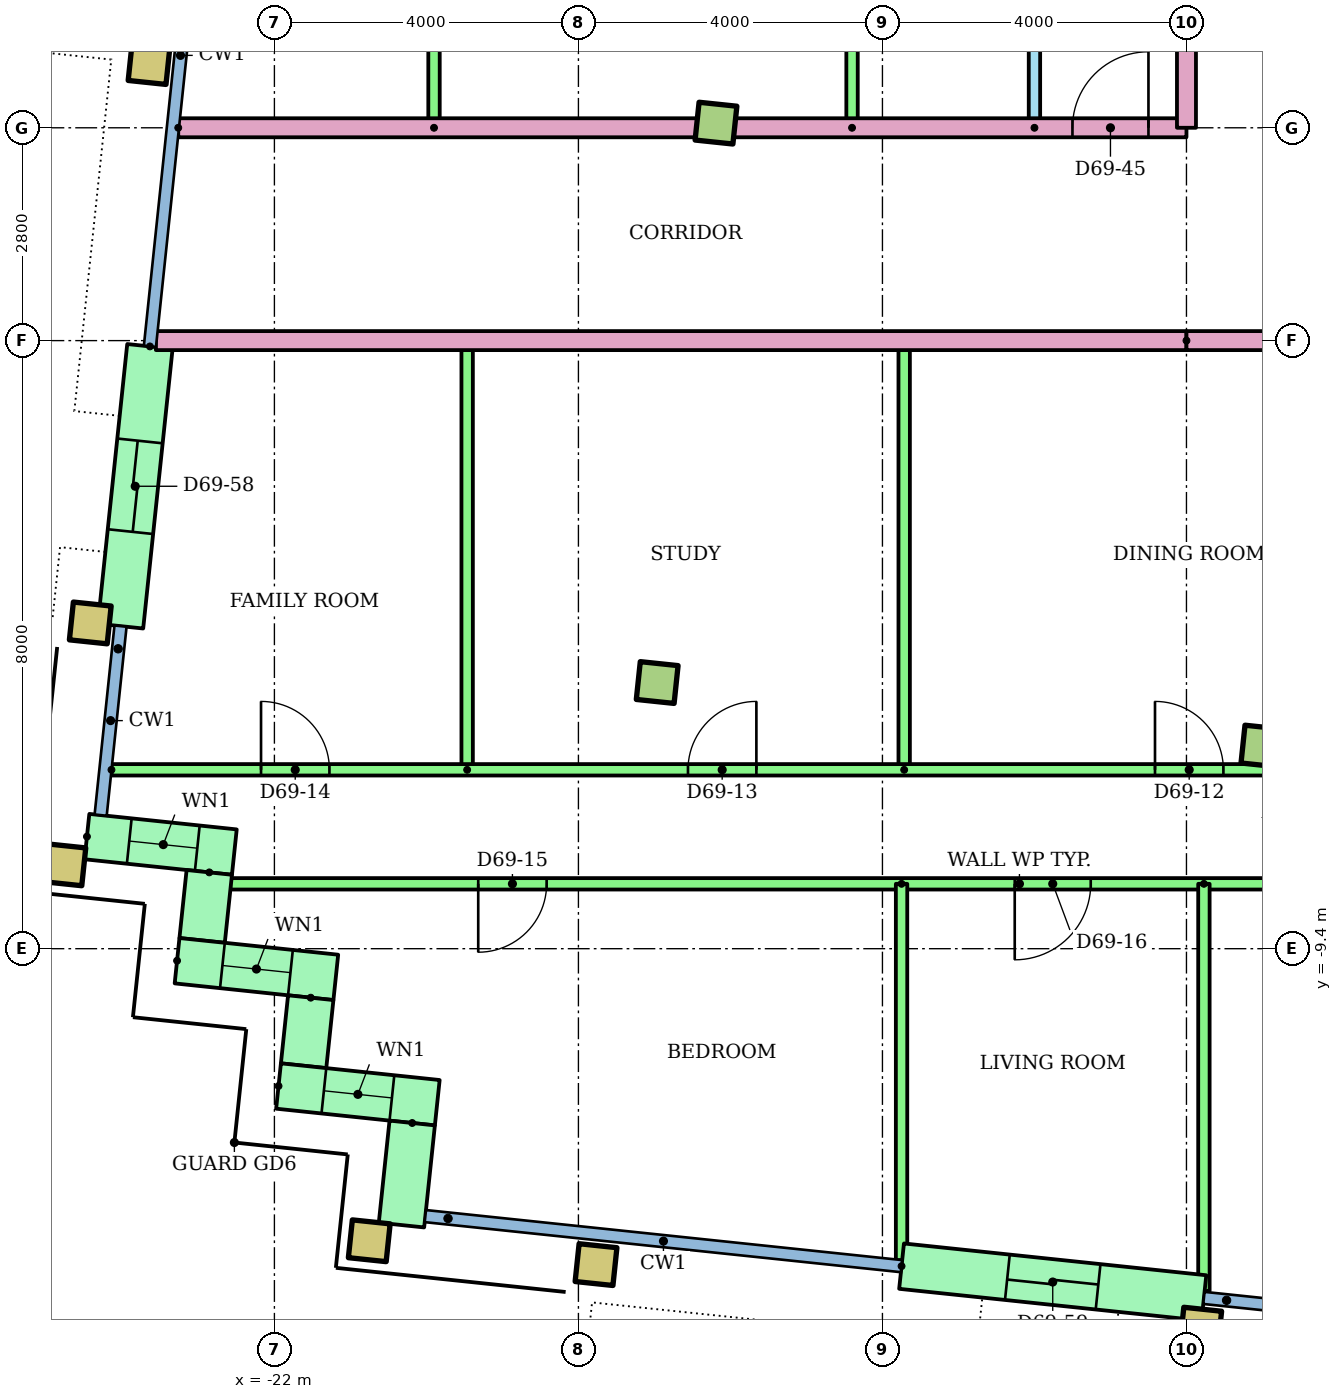
"""IFC4 building model, lengths in metres.
Left out: names, types, materials, properties, quantities, classifications, styles, units other than length and angle.
Written with IfcOpenShell. Run it as: python <this file> out.ifc"""

import sys

from ifc_helpers import new_model, si_unit, direction, frame, frame_2d, origin, origin_2d, place, context, subcontext, project, spatial, rectangle, hollow_rectangle, extrude, element, fill, save


model = new_model("IFC4")
c1 = context("Model", 3, precision=1e-05, world=origin(), true_north=direction((0.0, 1.0)))
c2 = subcontext(c1, "Body", "Model", "MODEL_VIEW")
j1 = project(units=[si_unit("LENGTHUNIT", "METRE"), si_unit("PLANEANGLEUNIT", "RADIAN")], contexts=[c1])
p1 = place(None, origin())
s1 = spatial("IfcSite", under=j1, at=p1, CompositionType="ELEMENT")
p2 = place(p1, origin())
s2 = spatial("IfcBuilding", under=s1, at=p2, CompositionType="ELEMENT")
p3 = place(p2, frame((0.0, 0.0, 265.9)))
s3 = spatial("IfcBuildingStorey", under=s2, at=p3, CompositionType="ELEMENT", Elevation=265.9)
for number, where, z_axis, x_axis in (
    (1, (-20.752, -13.243, 0.0), (0.0, 0.0, 1.0), (0.995, -0.105, 0.0)),
    (2, (-17.768, -13.556, 0.0), (0.0, 0.0, 1.0), (0.995, -0.105, 0.0)),
    (3, (-9.812, -14.392, 0.0), (0.0, 0.0, 1.0), (0.995, -0.105, 0.0)),
    (4, (-24.757, -8.297, 0.0), (0.0, 0.0, 1.0), (0.995, -0.105, 0.0)),
    (5, (-24.423, -5.115, 0.0), (0.0, 0.0, 1.0), (0.995, -0.105, 0.0)),
):
    element("IfcColumn", number, at=place(p3, frame(where, z_axis=z_axis, x_axis=x_axis)), inside=s3, PredefinedType="COLUMN", context=c2, shape_type="SweptSolid", body=[
        extrude(hollow_rectangle(XDim=0.5, YDim=0.5, WallThickness=0.025, at=origin_2d()), origin(), (0.0, 0.0, 1.0), 3.2),
    ])
for number, where, z_axis, x_axis in (
    (6, (-16.964, -5.898, 0.0), (0.0, 0.0, 1.0), (0.995, -0.105, 0.0)),
    (7, (-9.007, -6.735, 0.0), (0.0, 0.0, 1.0), (0.995, -0.105, 0.0)),
):
    element("IfcColumn", number, at=place(p3, frame(where, z_axis=z_axis, x_axis=x_axis)), inside=s3, PredefinedType="COLUMN", context=c2, shape_type="SweptSolid", body=[
        extrude(rectangle(XDim=0.5, YDim=0.5, at=origin_2d()), origin(), (0.0, 0.0, 1.0), 3.2),
    ])
p4 = place(p3, frame((-23.649, 2.245, 0.0), z_axis=(0.0, 0.0, 1.0), x_axis=(0.994521895368, -0.104528463268, 0.0)))
e8 = element("IfcColumn", 8, at=p4, inside=s3, PredefinedType="COLUMN", context=c2, shape_type="SweptSolid", body=[
    extrude(hollow_rectangle(XDim=0.5, YDim=0.5, WallThickness=0.025, at=origin_2d()), origin(), (0.0, 0.0, 1.0), 3.2),
])
p5 = place(p3, frame((-16.19, 1.461, 0.0), z_axis=(0.0, 0.0, 1.0), x_axis=(0.994521895368, -0.104528463268, 0.0)))
e9 = element("IfcColumn", 9, at=p5, inside=s3, PredefinedType="COLUMN", context=c2, shape_type="SweptSolid", body=[
    extrude(rectangle(XDim=0.5, YDim=0.5, at=origin_2d()), origin(), (0.0, 0.0, 1.0), 3.2),
])
p6 = place(p3, frame((-23.638, -1.476, 0.0), z_axis=(0.0, 0.0, 1.0), x_axis=(-0.104513052986, -0.994523514933, 0.0)))
e10 = element("IfcWall", 10, at=p6, inside=s3, PredefinedType="STANDARD", context=c2, shape_type="SweptSolid", body=[
    extrude(rectangle(XDim=3.7, YDim=0.6, at=frame_2d((1.85, 0.0))), origin(), (0.0, 0.0, 1.0), 2.92),
])
p7 = place(p6, frame((1.25, 0.0, 0.0)))
e11 = element("IfcOpeningElement", 11, at=p7, cuts=e10, PredefinedType="OPENING", context=c2, shape_type="SweptSolid", body=[
    extrude(rectangle(XDim=1.2, YDim=2.1, at=frame_2d((0.6, 1.05))), frame((0.0, 0.31, 0.0), z_axis=(0.0, -1.0, 0.0), x_axis=(1.0, 0.0, 0.0)), (0.0, 0.0, 1.0), 0.62),
])
p8 = place(p3, frame((-24.467, -7.925, 0.0), z_axis=(0.0, 0.0, 1.0), x_axis=(0.994521219184, -0.104534896528, 0.0)))
e12 = element("IfcWall", 12, at=p8, inside=s3, PredefinedType="STANDARD", context=c2, shape_type="SweptSolid", body=[
    extrude(rectangle(XDim=1.95, YDim=0.6, at=frame_2d((0.975, 0.0))), origin(), (0.0, 0.0, 1.0), 2.92),
])
p9 = place(p8, frame((0.56, 0.0, 0.9)))
e13 = element("IfcOpeningElement", 13, at=p9, cuts=e12, PredefinedType="OPENING", context=c2, shape_type="SweptSolid", body=[
    extrude(rectangle(XDim=0.9, YDim=1.5, at=frame_2d((0.45, 0.75))), frame((0.0, 0.31, 0.0), z_axis=(0.0, -1.0, 0.0), x_axis=(1.0, 0.0, 0.0)), (0.0, 0.0, 1.0), 0.62),
])
p10 = place(p3, frame((-22.857, -8.396, 0.0), z_axis=(0.0, 0.0, 1.0), x_axis=(-0.104444712852, -0.994530694326, 0.0)))
e14 = element("IfcWall", 14, at=p10, inside=s3, PredefinedType="STANDARD", context=c2, shape_type="SweptSolid", body=[
    extrude(rectangle(XDim=0.9, YDim=0.6, at=frame_2d((0.45, 0.0))), origin(), (0.0, 0.0, 1.0), 2.92),
])
p11 = place(p3, frame((-23.281, -9.558, 0.0), z_axis=(0.0, 0.0, 1.0), x_axis=(0.994523910136, -0.104509292252, 0.0)))
e15 = element("IfcWall", 15, at=p11, inside=s3, PredefinedType="STANDARD", context=c2, shape_type="SweptSolid", body=[
    extrude(rectangle(XDim=2.1, YDim=0.6, at=frame_2d((1.05, 0.0))), origin(), (0.0, 0.0, 1.0), 2.92),
])
p12 = place(p11, frame((0.6, 0.0, 0.9)))
e16 = element("IfcOpeningElement", 16, at=p12, cuts=e15, PredefinedType="OPENING", context=c2, shape_type="SweptSolid", body=[
    extrude(rectangle(XDim=0.9, YDim=1.5, at=frame_2d((0.45, 0.75))), frame((0.0, 0.31, 0.0), z_axis=(0.0, -1.0, 0.0), x_axis=(1.0, 0.0, 0.0)), (0.0, 0.0, 1.0), 0.62),
])
p13 = place(p3, frame((-21.522, -10.044, 0.0), z_axis=(0.0, 0.0, 1.0), x_axis=(-0.104416541099, -0.994533652495, 0.0)))
e17 = element("IfcWall", 17, at=p13, inside=s3, PredefinedType="STANDARD", context=c2, shape_type="SweptSolid", body=[
    extrude(rectangle(XDim=0.9, YDim=0.6, at=frame_2d((0.45, 0.0))), origin(), (0.0, 0.0, 1.0), 2.92),
])
p14 = place(p3, frame((-21.946, -11.207, 0.0), z_axis=(0.0, 0.0, 1.0), x_axis=(0.994511820899, -0.104624271047, 0.0)))
e18 = element("IfcWall", 18, at=p14, inside=s3, PredefinedType="STANDARD", context=c2, shape_type="SweptSolid", body=[
    extrude(rectangle(XDim=2.1, YDim=0.6, at=frame_2d((1.05, 0.0))), origin(), (0.0, 0.0, 1.0), 2.92),
])
p15 = place(p14, frame((0.6, 0.0, 0.9)))
e19 = element("IfcOpeningElement", 19, at=p15, cuts=e18, PredefinedType="OPENING", context=c2, shape_type="SweptSolid", body=[
    extrude(rectangle(XDim=0.9, YDim=1.5, at=frame_2d((0.45, 0.75))), frame((0.0, 0.31, 0.0), z_axis=(0.0, -1.0, 0.0), x_axis=(1.0, 0.0, 0.0)), (0.0, 0.0, 1.0), 0.62),
])
p16 = place(p3, frame((-20.187, -11.693, 0.0), z_axis=(0.0, 0.0, 1.0), x_axis=(-0.1043365026, -0.994542052517, 0.0)))
e20 = element("IfcWall", 20, at=p16, inside=s3, PredefinedType="STANDARD", context=c2, shape_type="SweptSolid", body=[
    extrude(rectangle(XDim=1.35, YDim=0.6, at=frame_2d((0.675, 0.0))), origin(), (0.0, 0.0, 1.0), 2.92),
])
p17 = place(p3, frame((-13.749, -13.576, 0.0), z_axis=(0.0, 0.0, 1.0), x_axis=(0.994519156568, -0.104554517933, 0.0)))
e21 = element("IfcWall", 21, at=p17, inside=s3, PredefinedType="STANDARD", context=c2, shape_type="SweptSolid", body=[
    extrude(rectangle(XDim=4.0, YDim=0.6, at=frame_2d((2.0, 0.0))), origin(), (0.0, 0.0, 1.0), 2.92),
])
p18 = place(p17, frame((1.4, 0.0, 0.0)))
e22 = element("IfcOpeningElement", 22, at=p18, cuts=e21, PredefinedType="OPENING", context=c2, shape_type="SweptSolid", body=[
    extrude(rectangle(XDim=1.2, YDim=2.1, at=frame_2d((0.6, 1.05))), frame((0.0, 0.31, 0.0), z_axis=(0.0, -1.0, 0.0), x_axis=(1.0, 0.0, 0.0)), (0.0, 0.0, 1.0), 0.62),
])
for number, where, z_axis, x_axis in (
    (23, (-13.714, -7.047, 0.0), (0.0, 0.0, 1.0), (0.0, 1.0, 0.0)),
    (24, (-19.464, -7.047, 0.0), (0.0, 0.0, 1.0), (0.0, 1.0, 0.0)),
):
    element("IfcWall", number, at=place(p3, frame(where, z_axis=z_axis, x_axis=x_axis)), inside=s3, PredefinedType="PARTITIONING", context=c2, shape_type="SweptSolid", body=[
        extrude(rectangle(XDim=5.647, YDim=0.15, at=frame_2d((2.823, 0.0))), origin(), (0.0, 0.0, 1.0), 2.4),
    ])
p19 = place(p3, frame((-24.144, -7.047, 0.0)))
e25 = element("IfcWall", 25, at=p19, inside=s3, PredefinedType="PARTITIONING", context=c2, shape_type="SweptSolid", body=[
    extrude(rectangle(XDim=20.33, YDim=0.15, at=frame_2d((10.165, 0.0))), origin(), (0.0, 0.0, 1.0), 2.4),
])
p20 = place(p19, frame((13.73, 0.0, 0.0)))
e26 = element("IfcOpeningElement", 26, at=p20, cuts=e25, PredefinedType="OPENING", context=c2, shape_type="SweptSolid", body=[
    extrude(rectangle(XDim=0.9, YDim=2.1, at=frame_2d((0.45, 1.05))), frame((0.0, 0.085, 0.0), z_axis=(0.0, -1.0, 0.0), x_axis=(1.0, 0.0, 0.0)), (0.0, 0.0, 1.0), 0.17),
])
p21 = place(p19, frame((7.585, 0.0, 0.0)))
e27 = element("IfcOpeningElement", 27, at=p21, cuts=e25, PredefinedType="OPENING", context=c2, shape_type="SweptSolid", body=[
    extrude(rectangle(XDim=0.9, YDim=2.1, at=frame_2d((0.45, 1.05))), frame((0.0, 0.085, 0.0), z_axis=(0.0, -1.0, 0.0), x_axis=(1.0, 0.0, 0.0)), (0.0, 0.0, 1.0), 0.17),
])
p22 = place(p19, frame((1.968, 0.0, 0.0)))
e28 = element("IfcOpeningElement", 28, at=p22, cuts=e25, PredefinedType="OPENING", context=c2, shape_type="SweptSolid", body=[
    extrude(rectangle(XDim=0.9, YDim=2.1, at=frame_2d((0.45, 1.05))), frame((0.0, 0.085, 0.0), z_axis=(0.0, -1.0, 0.0), x_axis=(1.0, 0.0, 0.0)), (0.0, 0.0, 1.0), 0.17),
])
p23 = place(p3, frame((-1.814, -8.547, 0.0), z_axis=(0.0, 0.0, 1.0), x_axis=(-1.0, 0.0, 0.0)))
e29 = element("IfcWall", 29, at=p23, inside=s3, PredefinedType="PARTITIONING", context=c2, shape_type="SweptSolid", body=[
    extrude(rectangle(XDim=20.767, YDim=0.15, at=frame_2d((10.384, 0.0))), origin(), (0.0, 0.0, 1.0), 2.4),
])
p24 = place(p23, frame((16.604, 0.0, 0.0)))
e30 = element("IfcOpeningElement", 30, at=p24, cuts=e29, PredefinedType="OPENING", context=c2, shape_type="SweptSolid", body=[
    extrude(rectangle(XDim=0.9, YDim=2.1, at=frame_2d((0.45, 1.05))), frame((0.0, 0.085, 0.0), z_axis=(0.0, -1.0, 0.0), x_axis=(1.0, 0.0, 0.0)), (0.0, 0.0, 1.0), 0.17),
])
p25 = place(p23, frame((9.446, 0.0, 0.0)))
e31 = element("IfcOpeningElement", 31, at=p25, cuts=e29, PredefinedType="OPENING", context=c2, shape_type="SweptSolid", body=[
    extrude(rectangle(XDim=1.0, YDim=2.1, at=frame_2d((0.5, 1.05))), frame((0.0, 0.085, 0.0), z_axis=(0.0, -1.0, 0.0), x_axis=(1.0, 0.0, 0.0)), (0.0, 0.0, 1.0), 0.17),
])
p26 = place(p23, frame((5.517, 0.0, 0.0)))
e32 = element("IfcOpeningElement", 32, at=p26, cuts=e29, PredefinedType="OPENING", context=c2, shape_type="SweptSolid", body=[
    extrude(rectangle(XDim=0.9, YDim=2.1, at=frame_2d((0.45, 1.05))), frame((0.0, 0.085, 0.0), z_axis=(0.0, -1.0, 0.0), x_axis=(1.0, 0.0, 0.0)), (0.0, 0.0, 1.0), 0.17),
])
p27 = place(p23, frame((1.539, 0.0, 0.0)))
e33 = element("IfcOpeningElement", 33, at=p27, cuts=e29, PredefinedType="OPENING", context=c2, shape_type="SweptSolid", body=[
    extrude(rectangle(XDim=0.9, YDim=2.1, at=frame_2d((0.45, 1.05))), frame((0.0, 0.085, 0.0), z_axis=(0.0, -1.0, 0.0), x_axis=(1.0, 0.0, 0.0)), (0.0, 0.0, 1.0), 0.17),
])
p28 = place(p3, frame((-13.749, -8.547, 0.0), z_axis=(0.0, 0.0, 1.0), x_axis=(0.0, -1.0, 0.0)))
e34 = element("IfcWall", 34, at=p28, inside=s3, PredefinedType="PARTITIONING", context=c2, shape_type="SweptSolid", body=[
    extrude(rectangle(XDim=4.95, YDim=0.15, at=frame_2d((2.475, 0.0))), origin(), (0.0, 0.0, 1.0), 2.4),
])
p29 = place(p3, frame((-9.771, -8.547, 0.0), z_axis=(0.0, 0.0, 1.0), x_axis=(0.0, -1.0, 0.0)))
e35 = element("IfcWall", 35, at=p29, inside=s3, PredefinedType="PARTITIONING", context=c2, shape_type="SweptSolid", body=[
    extrude(rectangle(XDim=5.358, YDim=0.15, at=frame_2d((2.679, 0.0))), origin(), (0.0, 0.0, 1.0), 2.4),
])
p30 = place(p3, frame((-10.0, -1.4, 0.0), z_axis=(0.0, 0.0, 1.0), x_axis=(-1.0, 0.0, 0.0)))
e36 = element("IfcWall", 36, at=p30, inside=s3, PredefinedType="PARTITIONING", context=c2, shape_type="SweptSolid", body=[
    extrude(rectangle(XDim=13.56, YDim=0.25, at=frame_2d((6.78, 0.0))), origin(), (0.0, 0.0, 1.0), 2.4),
])
p31 = place(p3, frame((-12.0, 1.4, 0.0), z_axis=(0.0, 0.0, 1.0), x_axis=(0.0, 1.0, 0.0)))
e37 = element("IfcWall", 37, at=p31, inside=s3, PredefinedType="PARTITIONING", context=c2, shape_type="SweptSolid", body=[
    extrude(rectangle(XDim=11.5, YDim=0.15, at=frame_2d((5.75, 0.0))), origin(), (0.0, 0.0, 1.0), 2.4),
])
p32 = place(p31, frame((2.675, 0.0, 0.0)))
e38 = element("IfcOpeningElement", 38, at=p32, cuts=e37, PredefinedType="OPENING", context=c2, shape_type="SweptSolid", body=[
    extrude(rectangle(XDim=0.9, YDim=2.1, at=frame_2d((0.45, 1.05))), frame((0.0, 0.085, 0.0), z_axis=(0.0, -1.0, 0.0), x_axis=(1.0, 0.0, 0.0)), (0.0, 0.0, 1.0), 0.17),
])
p33 = place(p31, frame((8.475, 0.0, 0.0)))
e39 = element("IfcOpeningElement", 39, at=p33, cuts=e37, PredefinedType="OPENING", context=c2, shape_type="SweptSolid", body=[
    extrude(rectangle(XDim=0.8, YDim=2.1, at=frame_2d((0.4, 1.05))), frame((0.0, 0.085, 0.0), z_axis=(0.0, -1.0, 0.0), x_axis=(1.0, 0.0, 0.0)), (0.0, 0.0, 1.0), 0.17),
])
for number, where, z_axis, x_axis in (
    (40, (-14.4, 1.4, 0.0), (0.0, 0.0, 1.0), (0.0, 1.0, 0.0)),
    (41, (-19.9, 1.4, 0.0), (0.0, 0.0, 1.0), (0.0, 1.0, 0.0)),
):
    element("IfcWall", number, at=place(p3, frame(where, z_axis=z_axis, x_axis=x_axis)), inside=s3, PredefinedType="PARTITIONING", context=c2, shape_type="SweptSolid", body=[
        extrude(rectangle(XDim=11.5, YDim=0.15, at=frame_2d((5.75, 0.0))), origin(), (0.0, 0.0, 1.0), 2.4),
    ])
p34 = place(p3, frame((-23.265, 1.4, 0.0)))
e42 = element("IfcWall", 42, at=p34, inside=s3, PredefinedType="PARTITIONING", context=c2, shape_type="SweptSolid", body=[
    extrude(rectangle(XDim=13.265, YDim=0.25, at=frame_2d((6.633, 0.0))), origin(), (0.0, 0.0, 1.0), 2.4),
])
p35 = place(p34, frame((11.765, 0.0, 0.0)))
e43 = element("IfcOpeningElement", 43, at=p35, cuts=e42, PredefinedType="OPENING", context=c2, shape_type="SweptSolid", body=[
    extrude(rectangle(XDim=1.0, YDim=2.1, at=frame_2d((0.5, 1.05))), frame((0.0, 0.135, 0.0), z_axis=(0.0, -1.0, 0.0), x_axis=(1.0, 0.0, 0.0)), (0.0, 0.0, 1.0), 0.27),
])
p36 = place(p3, frame((10.0, -1.4, 0.0), z_axis=(0.0, 0.0, 1.0), x_axis=(-1.0, 0.0, 0.0)))
e44 = element("IfcWall", 44, at=p36, inside=s3, PredefinedType="PARTITIONING", context=c2, shape_type="SweptSolid", body=[
    extrude(rectangle(XDim=20.0, YDim=0.25, at=frame_2d((10.0, 0.0))), origin(), (0.0, 0.0, 1.0), 2.4),
])
p37 = place(p36, frame((12.314, 0.0, 0.0)))
e45 = element("IfcOpeningElement", 45, at=p37, cuts=e44, PredefinedType="OPENING", context=c2, shape_type="SweptSolid", body=[
    extrude(rectangle(XDim=1.0, YDim=2.1, at=frame_2d((0.5, 1.05))), frame((0.0, 0.135, 0.0), z_axis=(0.0, -1.0, 0.0), x_axis=(1.0, 0.0, 0.0)), (0.0, 0.0, 1.0), 0.27),
])
p38 = place(p36, frame((10.57, 0.0, 0.0)))
e46 = element("IfcOpeningElement", 46, at=p38, cuts=e44, PredefinedType="OPENING", context=c2, shape_type="SweptSolid", body=[
    extrude(rectangle(XDim=0.9, YDim=2.1, at=frame_2d((0.45, 1.05))), frame((0.0, 0.135, 0.0), z_axis=(0.0, -1.0, 0.0), x_axis=(1.0, 0.0, 0.0)), (0.0, 0.0, 1.0), 0.27),
])
p39 = place(p3, frame((-10.0, 3.0, 0.0), z_axis=(0.0, 0.0, 1.0), x_axis=(0.0, -1.0, 0.0)))
e47 = element("IfcWall", 47, at=p39, inside=s3, PredefinedType="PARTITIONING", context=c2, shape_type="SweptSolid", body=[
    extrude(rectangle(XDim=1.6, YDim=0.25, at=frame_2d((0.8, 0.0))), origin(), (0.0, 0.0, 1.0), 2.4),
])
p40 = place(p9, origin())
e48 = element("IfcWindow", 48, at=p40, inside=s3, PartitioningType="SINGLE_PANEL", PredefinedType="WINDOW", context=c2, shape_type="SweptSolid", body=[
    extrude(rectangle(XDim=0.9, YDim=1.5, at=frame_2d((0.45, 0.75))), frame((0.0, 0.03, 0.0), z_axis=(0.0, -1.0, 0.0), x_axis=(1.0, 0.0, 0.0)), (0.0, 0.0, 1.0), 0.06),
])
fill(e13, e48)
p41 = place(p12, origin())
e49 = element("IfcWindow", 49, at=p41, inside=s3, PartitioningType="SINGLE_PANEL", PredefinedType="WINDOW", context=c2, shape_type="SweptSolid", body=[
    extrude(rectangle(XDim=0.9, YDim=1.5, at=frame_2d((0.45, 0.75))), frame((0.0, 0.03, 0.0), z_axis=(0.0, -1.0, 0.0), x_axis=(1.0, 0.0, 0.0)), (0.0, 0.0, 1.0), 0.06),
])
fill(e16, e49)
p42 = place(p15, origin())
e50 = element("IfcWindow", 50, at=p42, inside=s3, PartitioningType="SINGLE_PANEL", PredefinedType="WINDOW", context=c2, shape_type="SweptSolid", body=[
    extrude(rectangle(XDim=0.9, YDim=1.5, at=frame_2d((0.45, 0.75))), frame((0.0, 0.03, 0.0), z_axis=(0.0, -1.0, 0.0), x_axis=(1.0, 0.0, 0.0)), (0.0, 0.0, 1.0), 0.06),
])
fill(e19, e50)
p43 = place(p20, origin())
e51 = element("IfcDoor", 51, at=p43, inside=s3, OperationType="SINGLE_SWING_LEFT", PredefinedType="DOOR", context=c2, shape_type="SweptSolid", body=[
    extrude(rectangle(XDim=0.9, YDim=2.1, at=frame_2d((0.45, 1.05))), frame((0.0, 0.025, 0.0), z_axis=(0.0, -1.0, 0.0), x_axis=(1.0, 0.0, 0.0)), (0.0, 0.0, 1.0), 0.05),
])
fill(e26, e51)
p44 = place(p21, origin())
e52 = element("IfcDoor", 52, at=p44, inside=s3, OperationType="SINGLE_SWING_RIGHT", PredefinedType="DOOR", context=c2, shape_type="SweptSolid", body=[
    extrude(rectangle(XDim=0.9, YDim=2.1, at=frame_2d((0.45, 1.05))), frame((0.0, 0.025, 0.0), z_axis=(0.0, -1.0, 0.0), x_axis=(1.0, 0.0, 0.0)), (0.0, 0.0, 1.0), 0.05),
])
fill(e27, e52)
p45 = place(p22, origin())
e53 = element("IfcDoor", 53, at=p45, inside=s3, OperationType="SINGLE_SWING_LEFT", PredefinedType="DOOR", context=c2, shape_type="SweptSolid", body=[
    extrude(rectangle(XDim=0.9, YDim=2.1, at=frame_2d((0.45, 1.05))), frame((0.0, 0.025, 0.0), z_axis=(0.0, -1.0, 0.0), x_axis=(1.0, 0.0, 0.0)), (0.0, 0.0, 1.0), 0.05),
])
fill(e28, e53)
p46 = place(p24, origin())
e54 = element("IfcDoor", 54, at=p46, inside=s3, OperationType="SINGLE_SWING_RIGHT", PredefinedType="DOOR", context=c2, shape_type="SweptSolid", body=[
    extrude(rectangle(XDim=0.9, YDim=2.1, at=frame_2d((0.45, 1.05))), frame((0.0, 0.025, 0.0), z_axis=(0.0, -1.0, 0.0), x_axis=(1.0, 0.0, 0.0)), (0.0, 0.0, 1.0), 0.05),
])
fill(e30, e54)
p47 = place(p25, origin())
e55 = element("IfcDoor", 55, at=p47, inside=s3, OperationType="SINGLE_SWING_RIGHT", PredefinedType="DOOR", context=c2, shape_type="SweptSolid", body=[
    extrude(rectangle(XDim=1.0, YDim=2.1, at=frame_2d((0.5, 1.05))), frame((0.0, 0.025, 0.0), z_axis=(0.0, -1.0, 0.0), x_axis=(1.0, 0.0, 0.0)), (0.0, 0.0, 1.0), 0.05),
])
fill(e31, e55)
p48 = place(p35, origin())
e56 = element("IfcDoor", 56, at=p48, inside=s3, OperationType="SINGLE_SWING_RIGHT", PredefinedType="DOOR", context=c2, shape_type="SweptSolid", body=[
    extrude(rectangle(XDim=1.0, YDim=2.1, at=frame_2d((0.5, 1.05))), frame((0.0, 0.025, 0.0), z_axis=(0.0, -1.0, 0.0), x_axis=(1.0, 0.0, 0.0)), (0.0, 0.0, 1.0), 0.05),
])
fill(e43, e56)
p49 = place(p7, origin())
e57 = element("IfcDoor", 57, at=p49, inside=s3, OperationType="SLIDING_TO_LEFT", PredefinedType="DOOR", context=c2, shape_type="SweptSolid", body=[
    extrude(rectangle(XDim=1.2, YDim=2.1, at=frame_2d((0.6, 1.05))), frame((0.0, 0.025, 0.0), z_axis=(0.0, -1.0, 0.0), x_axis=(1.0, 0.0, 0.0)), (0.0, 0.0, 1.0), 0.05),
])
fill(e11, e57)
p50 = place(p18, origin())
e58 = element("IfcDoor", 58, at=p50, inside=s3, OperationType="SLIDING_TO_LEFT", PredefinedType="DOOR", context=c2, shape_type="SweptSolid", body=[
    extrude(rectangle(XDim=1.2, YDim=2.1, at=frame_2d((0.6, 1.05))), frame((0.0, 0.025, 0.0), z_axis=(0.0, -1.0, 0.0), x_axis=(1.0, 0.0, 0.0)), (0.0, 0.0, 1.0), 0.05),
])
fill(e22, e58)
save(model, sys.argv[1])
